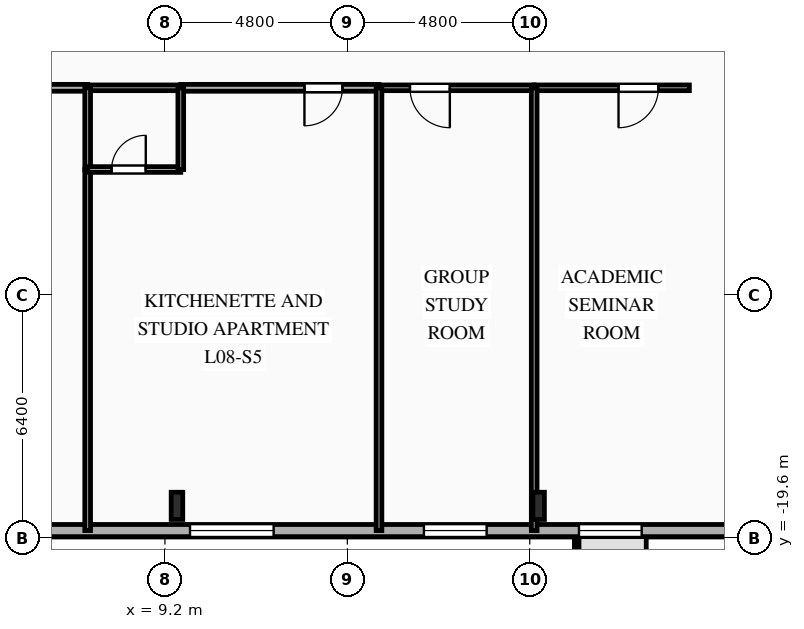
"""IFC4 building model, lengths in metres.
Left out: names, types, materials, properties, quantities, classifications, styles, units other than length and angle.
Written with IfcOpenShell. Run it as: python <this file> out.ifc"""

import sys

from ifc_helpers import new_model, si_unit, direction, frame, frame_2d, origin, origin_2d, place, context, subcontext, project, spatial, rectangle, i_section, extrude, element, fill, save


model = new_model("IFC4")
c1 = context("Model", 3, precision=1e-05, world=origin(), true_north=direction((0.0, 1.0)))
c2 = subcontext(c1, "Body", "Model", "MODEL_VIEW")
j1 = project(units=[si_unit("LENGTHUNIT", "METRE"), si_unit("PLANEANGLEUNIT", "RADIAN")], contexts=[c1])
p1 = place(None, origin())
s1 = spatial("IfcSite", under=j1, at=p1, CompositionType="ELEMENT")
p2 = place(p1, origin())
s2 = spatial("IfcBuilding", under=s1, at=p2, CompositionType="ELEMENT")
p3 = place(p2, frame((0.0, 0.0, 33.7)))
s3 = spatial("IfcBuildingStorey", under=s2, at=p3, CompositionType="ELEMENT", Elevation=33.7)
for number, where, z_axis, x_axis in (
    (1, (9.517, -18.75, 0.0), (0.0, 0.0, 1.0), (1.0, 0.0, 0.0)),
    (2, (19.033, -18.75, 0.0), (0.0, 0.0, 1.0), (1.0, 0.0, 0.0)),
):
    element("IfcColumn", number, at=place(p3, frame(where, z_axis=z_axis, x_axis=x_axis)), inside=s3, PredefinedType="COLUMN", context=c2, shape_type="SweptSolid", body=[
        extrude(i_section(OverallWidth=0.304, OverallDepth=0.716, WebThickness=0.021, FlangeThickness=0.04, FilletRadius=0.027, at=origin_2d()), origin(), (0.0, 0.0, 1.0), 3.35),
    ])
p4 = place(p3, frame((29.2, -19.4, 0.0), z_axis=(0.0, 0.0, 1.0), x_axis=(-1.0, 0.0, 0.0)))
e3 = element("IfcWall", 3, at=p4, inside=s3, PredefinedType="SOLIDWALL", context=c2, shape_type="SweptSolid", body=[
    extrude(rectangle(XDim=58.4, YDim=0.32, at=frame_2d((29.2, 0.0))), origin(), (0.0, 0.0, 1.0), 3.035),
])
p5 = place(p4, frame((7.455, 0.0, 0.85)))
e4 = element("IfcOpeningElement", 4, at=p5, cuts=e3, PredefinedType="OPENING", context=c2, shape_type="SweptSolid", body=[
    extrude(rectangle(XDim=1.65, YDim=1.85, at=frame_2d((0.825, 0.925))), frame((0.0, 0.17, 0.0), z_axis=(0.0, -1.0, 0.0), x_axis=(1.0, 0.0, 0.0)), (0.0, 0.0, 1.0), 0.34),
])
p6 = place(p4, frame((11.535, 0.0, 0.85)))
e5 = element("IfcOpeningElement", 5, at=p6, cuts=e3, PredefinedType="OPENING", context=c2, shape_type="SweptSolid", body=[
    extrude(rectangle(XDim=1.65, YDim=1.85, at=frame_2d((0.825, 0.925))), frame((0.0, 0.17, 0.0), z_axis=(0.0, -1.0, 0.0), x_axis=(1.0, 0.0, 0.0)), (0.0, 0.0, 1.0), 0.34),
])
p7 = place(p4, frame((17.14, 0.0, 0.85)))
e6 = element("IfcOpeningElement", 6, at=p7, cuts=e3, PredefinedType="OPENING", context=c2, shape_type="SweptSolid", body=[
    extrude(rectangle(XDim=2.2, YDim=1.85, at=frame_2d((1.1, 0.925))), frame((0.0, 0.17, 0.0), z_axis=(0.0, -1.0, 0.0), x_axis=(1.0, 0.0, 0.0)), (0.0, 0.0, 1.0), 0.34),
])
p8 = place(p4, frame((24.82, 0.0, 0.85)))
e7 = element("IfcOpeningElement", 7, at=p8, cuts=e3, PredefinedType="OPENING", context=c2, shape_type="SweptSolid", body=[
    extrude(rectangle(XDim=2.2, YDim=1.85, at=frame_2d((1.1, 0.925))), frame((0.0, 0.17, 0.0), z_axis=(0.0, -1.0, 0.0), x_axis=(1.0, 0.0, 0.0)), (0.0, 0.0, 1.0), 0.34),
])
p9 = place(p4, frame((32.5, 0.0, 0.85)))
e8 = element("IfcOpeningElement", 8, at=p9, cuts=e3, PredefinedType="OPENING", context=c2, shape_type="SweptSolid", body=[
    extrude(rectangle(XDim=2.2, YDim=1.85, at=frame_2d((1.1, 0.925))), frame((0.0, 0.17, 0.0), z_axis=(0.0, -1.0, 0.0), x_axis=(1.0, 0.0, 0.0)), (0.0, 0.0, 1.0), 0.34),
])
p10 = place(p4, frame((40.14, 0.0, 0.85)))
e9 = element("IfcOpeningElement", 9, at=p10, cuts=e3, PredefinedType="OPENING", context=c2, shape_type="SweptSolid", body=[
    extrude(rectangle(XDim=2.2, YDim=1.85, at=frame_2d((1.1, 0.925))), frame((0.0, 0.17, 0.0), z_axis=(0.0, -1.0, 0.0), x_axis=(1.0, 0.0, 0.0)), (0.0, 0.0, 1.0), 0.34),
])
p11 = place(p4, frame((46.015, 0.0, 0.85)))
e10 = element("IfcOpeningElement", 10, at=p11, cuts=e3, PredefinedType="OPENING", context=c2, shape_type="SweptSolid", body=[
    extrude(rectangle(XDim=1.65, YDim=1.85, at=frame_2d((0.825, 0.925))), frame((0.0, 0.17, 0.0), z_axis=(0.0, -1.0, 0.0), x_axis=(1.0, 0.0, 0.0)), (0.0, 0.0, 1.0), 0.34),
])
p12 = place(p4, frame((49.615, 0.0, 0.85)))
e11 = element("IfcOpeningElement", 11, at=p12, cuts=e3, PredefinedType="OPENING", context=c2, shape_type="SweptSolid", body=[
    extrude(rectangle(XDim=1.65, YDim=1.85, at=frame_2d((0.825, 0.925))), frame((0.0, 0.17, 0.0), z_axis=(0.0, -1.0, 0.0), x_axis=(1.0, 0.0, 0.0)), (0.0, 0.0, 1.0), 0.34),
])
p13 = place(p3, frame((7.167, -7.75, 0.0), z_axis=(0.0, 0.0, 1.0), x_axis=(-1.0, 0.0, 0.0)))
e12 = element("IfcWall", 12, at=p13, inside=s3, PredefinedType="PARTITIONING", context=c2, shape_type="SweptSolid", body=[
    extrude(rectangle(XDim=5.217, YDim=0.18, at=frame_2d((2.608, 0.0))), origin(), (0.0, 0.0, 1.0), 3.035),
])
p14 = place(p13, frame((3.255, 0.0, 0.0)))
e13 = element("IfcOpeningElement", 13, at=p14, cuts=e12, PredefinedType="OPENING", context=c2, shape_type="SweptSolid", body=[
    extrude(rectangle(XDim=1.0, YDim=2.15, at=frame_2d((0.5, 1.075))), frame((0.0, 0.1, 0.0), z_axis=(0.0, -1.0, 0.0), x_axis=(1.0, 0.0, 0.0)), (0.0, 0.0, 1.0), 0.2),
])
p15 = place(p3, frame((14.833, -7.75, 0.0), z_axis=(0.0, 0.0, 1.0), x_axis=(-1.0, 0.0, 0.0)))
e14 = element("IfcWall", 14, at=p15, inside=s3, PredefinedType="PARTITIONING", context=c2, shape_type="SweptSolid", body=[
    extrude(rectangle(XDim=5.216, YDim=0.18, at=frame_2d((2.608, 0.0))), origin(), (0.0, 0.0, 1.0), 3.035),
])
p16 = place(p15, frame((0.962, 0.0, 0.0)))
e15 = element("IfcOpeningElement", 15, at=p16, cuts=e14, PredefinedType="OPENING", context=c2, shape_type="SweptSolid", body=[
    extrude(rectangle(XDim=1.0, YDim=2.15, at=frame_2d((0.5, 1.075))), frame((0.0, 0.1, 0.0), z_axis=(0.0, -1.0, 0.0), x_axis=(1.0, 0.0, 0.0)), (0.0, 0.0, 1.0), 0.2),
])
p17 = place(p3, frame((9.617, -7.75, 0.0), z_axis=(0.0, 0.0, 1.0), x_axis=(-1.0, 0.0, 0.0)))
e16 = element("IfcWall", 16, at=p17, inside=s3, PredefinedType="PLUMBINGWALL", context=c2, shape_type="SweptSolid", body=[
    extrude(rectangle(XDim=2.45, YDim=0.15, at=frame_2d((1.225, 0.0))), origin(), (0.0, 0.0, 1.0), 3.035),
])
p18 = place(p3, frame((18.917, -7.75, 0.0), z_axis=(0.0, 0.0, 1.0), x_axis=(-1.0, 0.0, 0.0)))
e17 = element("IfcWall", 17, at=p18, inside=s3, PredefinedType="PARTITIONING", context=c2, shape_type="SweptSolid", body=[
    extrude(rectangle(XDim=4.083, YDim=0.15, at=frame_2d((2.042, 0.0))), origin(), (0.0, 0.0, 1.0), 3.035),
])
p19 = place(p18, frame((2.219, 0.0, 0.0)))
e18 = element("IfcOpeningElement", 18, at=p19, cuts=e17, PredefinedType="OPENING", context=c2, shape_type="SweptSolid", body=[
    extrude(rectangle(XDim=1.05, YDim=2.15, at=frame_2d((0.525, 1.075))), frame((0.0, 0.085, 0.0), z_axis=(0.0, -1.0, 0.0), x_axis=(1.0, 0.0, 0.0)), (0.0, 0.0, 1.0), 0.17),
])
p20 = place(p3, frame((23.0, -7.75, 0.0), z_axis=(0.0, 0.0, 1.0), x_axis=(-1.0, 0.0, 0.0)))
e19 = element("IfcWall", 19, at=p20, inside=s3, PredefinedType="PARTITIONING", context=c2, shape_type="SweptSolid", body=[
    extrude(rectangle(XDim=4.083, YDim=0.15, at=frame_2d((2.042, 0.0))), origin(), (0.0, 0.0, 1.0), 3.035),
])
p21 = place(p20, frame((0.814, 0.0, 0.0)))
e20 = element("IfcOpeningElement", 20, at=p21, cuts=e19, PredefinedType="OPENING", context=c2, shape_type="SweptSolid", body=[
    extrude(rectangle(XDim=1.05, YDim=2.15, at=frame_2d((0.525, 1.075))), frame((0.0, 0.085, 0.0), z_axis=(0.0, -1.0, 0.0), x_axis=(1.0, 0.0, 0.0)), (0.0, 0.0, 1.0), 0.17),
])
p22 = place(p3, frame((7.167, -9.9, 0.0), z_axis=(0.0, 0.0, 1.0), x_axis=(0.0, -1.0, 0.0)))
e21 = element("IfcWall", 21, at=p22, inside=s3, PredefinedType="PARTITIONING", context=c2, shape_type="SweptSolid", body=[
    extrude(rectangle(XDim=9.5, YDim=0.15, at=frame_2d((4.75, 0.0))), origin(), (0.0, 0.0, 1.0), 3.035),
])
p23 = place(p3, frame((7.167, -7.75, 0.0), z_axis=(0.0, 0.0, 1.0), x_axis=(0.0, -1.0, 0.0)))
e22 = element("IfcWall", 22, at=p23, inside=s3, PredefinedType="PLUMBINGWALL", context=c2, shape_type="SweptSolid", body=[
    extrude(rectangle(XDim=2.15, YDim=0.15, at=frame_2d((1.075, 0.0))), origin(), (0.0, 0.0, 1.0), 3.035),
])
p24 = place(p3, frame((7.167, -9.9, 0.0), z_axis=(0.0, 0.0, 1.0), x_axis=(1.0, 0.0, 0.0)))
e23 = element("IfcWall", 23, at=p24, inside=s3, PredefinedType="PLUMBINGWALL", context=c2, shape_type="SweptSolid", body=[
    extrude(rectangle(XDim=2.45, YDim=0.15, at=frame_2d((1.225, 0.0))), origin(), (0.0, 0.0, 1.0), 3.035),
])
p25 = place(p24, frame((0.629, 0.0, 0.0)))
e24 = element("IfcOpeningElement", 24, at=p25, cuts=e23, PredefinedType="OPENING", context=c2, shape_type="SweptSolid", body=[
    extrude(rectangle(XDim=0.9, YDim=2.1, at=frame_2d((0.45, 1.05))), frame((0.0, 0.085, 0.0), z_axis=(0.0, -1.0, 0.0), x_axis=(1.0, 0.0, 0.0)), (0.0, 0.0, 1.0), 0.17),
])
p26 = place(p3, frame((9.617, -9.9, 0.0), z_axis=(0.0, 0.0, 1.0), x_axis=(0.0, 1.0, 0.0)))
e25 = element("IfcWall", 25, at=p26, inside=s3, PredefinedType="PLUMBINGWALL", context=c2, shape_type="SweptSolid", body=[
    extrude(rectangle(XDim=2.15, YDim=0.15, at=frame_2d((1.075, 0.0))), origin(), (0.0, 0.0, 1.0), 3.035),
])
p27 = place(p3, frame((14.833, -7.75, 0.0), z_axis=(0.0, 0.0, 1.0), x_axis=(0.0, -1.0, 0.0)))
e26 = element("IfcWall", 26, at=p27, inside=s3, PredefinedType="PARTITIONING", context=c2, shape_type="SweptSolid", body=[
    extrude(rectangle(XDim=11.65, YDim=0.15, at=frame_2d((5.825, 0.0))), origin(), (0.0, 0.0, 1.0), 3.035),
])
p28 = place(p3, frame((18.917, -7.75, 0.0), z_axis=(0.0, 0.0, 1.0), x_axis=(0.0, -1.0, 0.0)))
e27 = element("IfcWall", 27, at=p28, inside=s3, PredefinedType="PARTITIONING", context=c2, shape_type="SweptSolid", body=[
    extrude(rectangle(XDim=11.65, YDim=0.15, at=frame_2d((5.825, 0.0))), origin(), (0.0, 0.0, 1.0), 2.52),
])
p29 = place(p5, origin())
e28 = element("IfcWindow", 28, at=p29, inside=s3, PartitioningType="SINGLE_PANEL", PredefinedType="WINDOW", context=c2, shape_type="SweptSolid", body=[
    extrude(rectangle(XDim=1.65, YDim=1.85, at=frame_2d((0.825, 0.925))), frame((0.0, 0.03, 0.0), z_axis=(0.0, -1.0, 0.0), x_axis=(1.0, 0.0, 0.0)), (0.0, 0.0, 1.0), 0.06),
])
fill(e4, e28)
p30 = place(p6, origin())
e29 = element("IfcWindow", 29, at=p30, inside=s3, PartitioningType="SINGLE_PANEL", PredefinedType="WINDOW", context=c2, shape_type="SweptSolid", body=[
    extrude(rectangle(XDim=1.65, YDim=1.85, at=frame_2d((0.825, 0.925))), frame((0.0, 0.03, 0.0), z_axis=(0.0, -1.0, 0.0), x_axis=(1.0, 0.0, 0.0)), (0.0, 0.0, 1.0), 0.06),
])
fill(e5, e29)
p31 = place(p7, origin())
e30 = element("IfcWindow", 30, at=p31, inside=s3, PartitioningType="SINGLE_PANEL", PredefinedType="WINDOW", context=c2, shape_type="SweptSolid", body=[
    extrude(rectangle(XDim=2.2, YDim=1.85, at=frame_2d((1.1, 0.925))), frame((0.0, 0.03, 0.0), z_axis=(0.0, -1.0, 0.0), x_axis=(1.0, 0.0, 0.0)), (0.0, 0.0, 1.0), 0.06),
])
fill(e6, e30)
p32 = place(p16, origin())
e31 = element("IfcDoor", 31, at=p32, inside=s3, OperationType="SINGLE_SWING_RIGHT", PredefinedType="DOOR", context=c2, shape_type="SweptSolid", body=[
    extrude(rectangle(XDim=1.0, YDim=2.15, at=frame_2d((0.5, 1.075))), frame((0.0, 0.025, 0.0), z_axis=(0.0, -1.0, 0.0), x_axis=(1.0, 0.0, 0.0)), (0.0, 0.0, 1.0), 0.05),
])
fill(e15, e31)
p33 = place(p19, origin())
e32 = element("IfcDoor", 32, at=p33, inside=s3, OperationType="SINGLE_SWING_LEFT", PredefinedType="DOOR", context=c2, shape_type="SweptSolid", body=[
    extrude(rectangle(XDim=1.05, YDim=2.15, at=frame_2d((0.525, 1.075))), frame((0.0, 0.025, 0.0), z_axis=(0.0, -1.0, 0.0), x_axis=(1.0, 0.0, 0.0)), (0.0, 0.0, 1.0), 0.05),
])
fill(e18, e32)
p34 = place(p21, origin())
e33 = element("IfcDoor", 33, at=p34, inside=s3, OperationType="SINGLE_SWING_RIGHT", PredefinedType="DOOR", context=c2, shape_type="SweptSolid", body=[
    extrude(rectangle(XDim=1.05, YDim=2.15, at=frame_2d((0.525, 1.075))), frame((0.0, 0.025, 0.0), z_axis=(0.0, -1.0, 0.0), x_axis=(1.0, 0.0, 0.0)), (0.0, 0.0, 1.0), 0.05),
])
fill(e20, e33)
p35 = place(p25, origin())
e34 = element("IfcDoor", 34, at=p35, inside=s3, OperationType="SINGLE_SWING_RIGHT", PredefinedType="DOOR", context=c2, shape_type="SweptSolid", body=[
    extrude(rectangle(XDim=0.9, YDim=2.1, at=frame_2d((0.45, 1.05))), frame((0.0, 0.025, 0.0), z_axis=(0.0, -1.0, 0.0), x_axis=(1.0, 0.0, 0.0)), (0.0, 0.0, 1.0), 0.05),
])
fill(e24, e34)
save(model, sys.argv[1])
